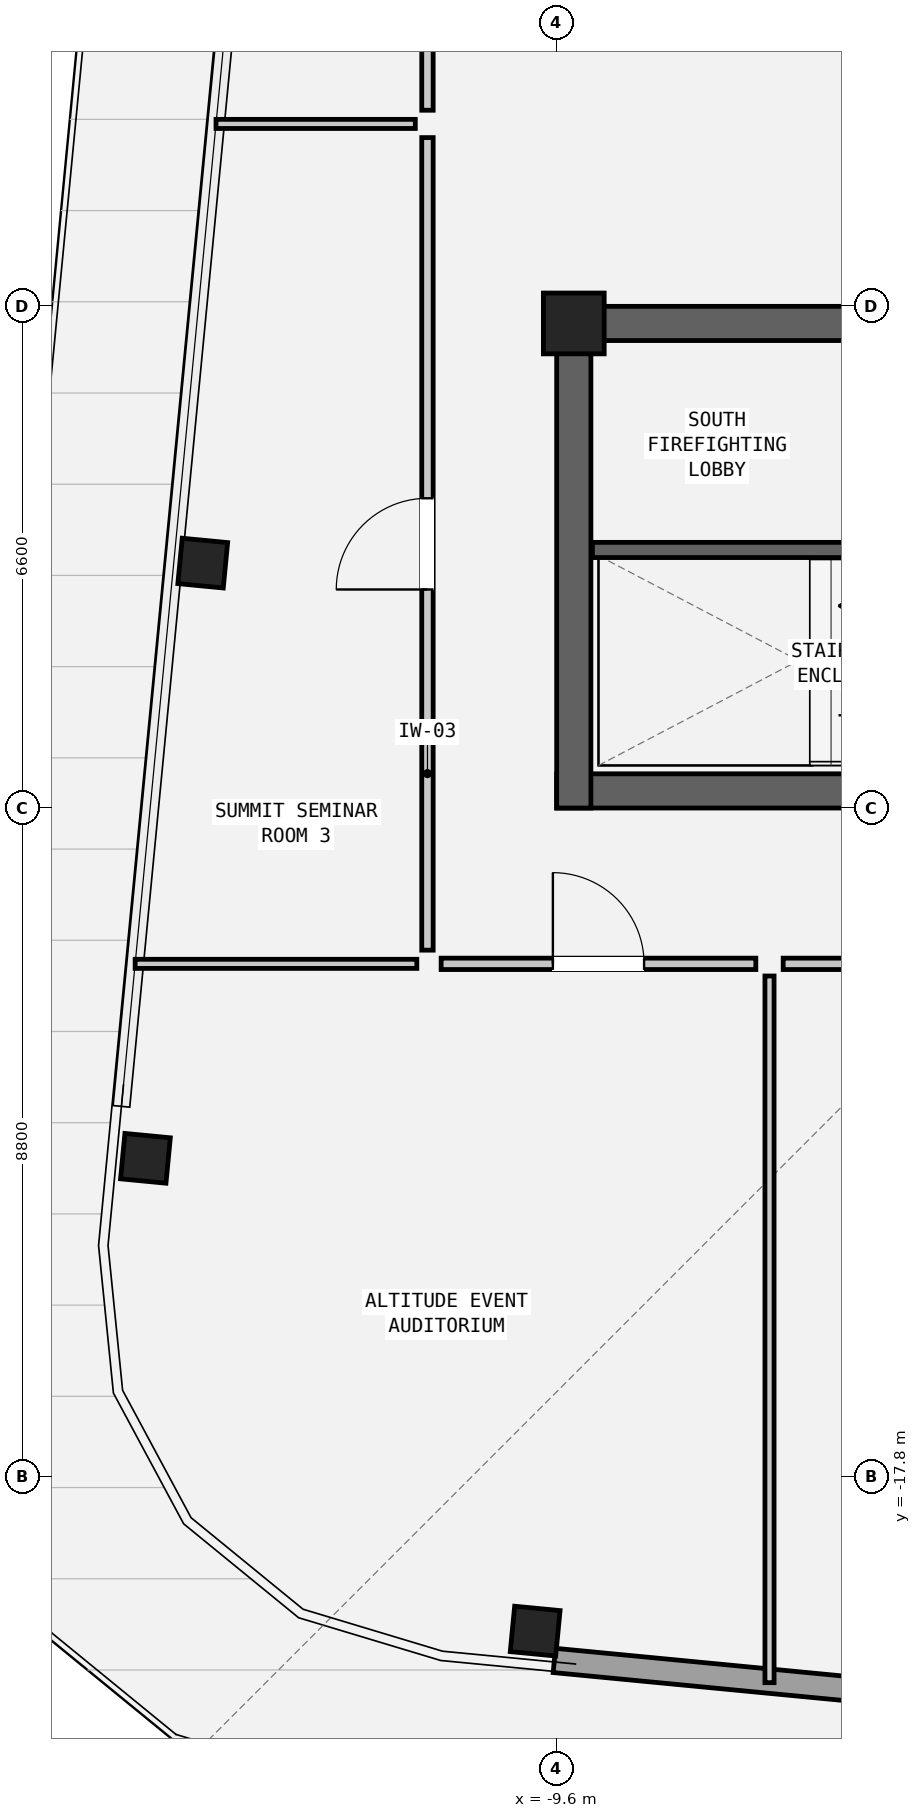
"""IFC4 building model, lengths in metres.
Left out: names, types, materials, properties, quantities, classifications, styles, units other than length and angle.
Written with IfcOpenShell. Run it as: python <this file> out.ifc"""

import sys

from ifc_helpers import new_model, si_unit, direction, frame, frame_2d, origin, origin_2d, place, context, subcontext, project, spatial, rectangle, hollow_rectangle, extrude, element, fill, save


model = new_model("IFC4")
c1 = context("Model", 3, precision=1e-05, world=origin(), true_north=direction((0.0, 1.0)))
c2 = subcontext(c1, "Body", "Model", "MODEL_VIEW")
j1 = project(units=[si_unit("LENGTHUNIT", "METRE"), si_unit("PLANEANGLEUNIT", "RADIAN")], contexts=[c1])
p1 = place(None, origin())
s1 = spatial("IfcSite", under=j1, at=p1, CompositionType="ELEMENT")
p2 = place(p1, origin())
s2 = spatial("IfcBuilding", under=s1, at=p2, CompositionType="ELEMENT")
p3 = place(p2, frame((0.0, 0.0, 276.95)))
s3 = spatial("IfcBuildingStorey", under=s2, at=p3, CompositionType="ELEMENT", Elevation=276.95)
p4 = place(p3, frame((-9.6, -8.775, 0.0), z_axis=(0.0, 0.0, 1.0), x_axis=(1.0, 0.0, 0.0)))
e1 = element("IfcWall", 1, at=p4, inside=s3, PredefinedType="SHEAR", context=c2, shape_type="SweptSolid", body=[
    extrude(rectangle(XDim=19.2, YDim=0.45, at=frame_2d((9.6, 0.0))), origin(), (0.0, 0.0, 1.0), 3.6),
])
p5 = place(p3, frame((-9.6, -2.625, 0.0), z_axis=(0.0, 0.0, 1.0), x_axis=(1.0, 0.0, 0.0)))
e2 = element("IfcWall", 2, at=p5, inside=s3, PredefinedType="SHEAR", context=c2, shape_type="SweptSolid", body=[
    extrude(rectangle(XDim=19.2, YDim=0.45, at=frame_2d((9.6, 0.0))), origin(), (0.0, 0.0, 1.0), 3.6),
])
p6 = place(p5, frame((3.8, 0.0, 0.0)))
e3 = element("IfcOpeningElement", 3, at=p6, cuts=e2, PredefinedType="OPENING", context=c2, shape_type="SweptSolid", body=[
    extrude(rectangle(XDim=1.1, YDim=2.08, at=frame_2d((0.55, 1.04))), frame((0.0, 0.237, 0.0), z_axis=(0.0, -1.0, 0.0), x_axis=(1.0, 0.0, 0.0)), (0.0, 0.0, 1.0), 0.474),
])
p7 = place(p5, frame((10.8, 0.0, 0.0)))
e4 = element("IfcOpeningElement", 4, at=p7, cuts=e2, PredefinedType="OPENING", context=c2, shape_type="SweptSolid", body=[
    extrude(rectangle(XDim=0.95, YDim=2.1, at=frame_2d((0.475, 1.05))), frame((0.0, 0.237, 0.0), z_axis=(0.0, -1.0, 0.0), x_axis=(1.0, 0.0, 0.0)), (0.0, 0.0, 1.0), 0.474),
])
p8 = place(p5, frame((14.8, 0.0, 0.0)))
e5 = element("IfcOpeningElement", 5, at=p8, cuts=e2, PredefinedType="OPENING", context=c2, shape_type="SweptSolid", body=[
    extrude(rectangle(XDim=1.6, YDim=2.12, at=frame_2d((0.8, 1.06))), frame((0.0, 0.237, 0.0), z_axis=(0.0, -1.0, 0.0), x_axis=(1.0, 0.0, 0.0)), (0.0, 0.0, 1.0), 0.474),
])
p9 = place(p3, frame((-9.375, -9.0, 0.0), z_axis=(0.0, 0.0, 1.0), x_axis=(0.0, 1.0, 0.0)))
e6 = element("IfcWall", 6, at=p9, inside=s3, PredefinedType="SHEAR", context=c2, shape_type="SweptSolid", body=[
    extrude(rectangle(XDim=6.6, YDim=0.45, at=frame_2d((3.3, 0.0))), origin(), (0.0, 0.0, 1.0), 3.6),
])
for number, where, z_axis, x_axis in (
    (7, (-9.883, -19.829, 0.0), (0.0, 0.0, 1.0), (0.995, -0.096, 0.0)),
    (8, (-14.256, -5.778, 0.0), (0.0, 0.0, 1.0), (0.096, 0.995, 0.0)),
    (9, (-15.01, -13.608, 0.0), (0.0, 0.0, 1.0), (0.096, 0.995, 0.0)),
):
    element("IfcColumn", number, at=place(p3, frame(where, z_axis=z_axis, x_axis=x_axis)), inside=s3, PredefinedType="COLUMN", context=c2, shape_type="SweptSolid", body=[
        extrude(hollow_rectangle(XDim=0.6, YDim=0.6, WallThickness=0.04, at=origin_2d()), origin(), (0.0, 0.0, 1.0), 3.6),
    ])
p10 = place(p3, frame((-9.375, -2.625, 0.0), z_axis=(0.0, 0.0, 1.0), x_axis=(1.0, 0.0, 0.0)))
e10 = element("IfcColumn", 10, at=p10, inside=s3, PredefinedType="COLUMN", context=c2, shape_type="SweptSolid", body=[
    extrude(rectangle(XDim=0.8, YDim=0.8, at=origin_2d()), origin(), (0.0, 0.0, 1.0), 3.6),
])
p11 = place(p3, frame((13.287, -22.421, 0.0), z_axis=(0.0, 0.0, 1.0), x_axis=(-0.995396042099, 0.095847375411, 0.0)))
e11 = element("IfcWall", 11, at=p11, inside=s3, PredefinedType="SOLIDWALL", context=c2, shape_type="SweptSolid", body=[
    extrude(rectangle(XDim=23.024, YDim=0.32, at=frame_2d((11.512, 0.0))), origin(), (0.0, 0.0, 1.0), 2.984),
])
p12 = place(p11, frame((3.811, 0.0, 0.0)))
e12 = element("IfcOpeningElement", 12, at=p12, cuts=e11, PredefinedType="OPENING", context=c2, shape_type="SweptSolid", body=[
    extrude(rectangle(XDim=1.25, YDim=2.02, at=frame_2d((0.625, 1.01))), frame((0.0, 0.172, 0.0), z_axis=(0.0, -1.0, 0.0), x_axis=(1.0, 0.0, 0.0)), (0.0, 0.0, 1.0), 0.344),
])
p13 = place(p3, frame((-9.13, -5.605, 0.0), z_axis=(0.0, 0.0, 1.0), x_axis=(1.0, 0.0, 0.0)))
e13 = element("IfcWall", 13, at=p13, inside=s3, PredefinedType="SHEAR", context=c2, shape_type="SweptSolid", body=[
    extrude(rectangle(XDim=6.77, YDim=0.2, at=frame_2d((3.385, 0.0))), origin(), (0.0, 0.0, 1.0), 3.41),
])
p14 = place(p13, frame((5.5, 0.0, 0.0)))
e14 = element("IfcOpeningElement", 14, at=p14, cuts=e13, PredefinedType="OPENING", context=c2, shape_type="SweptSolid", body=[
    extrude(rectangle(XDim=1.05, YDim=2.08, at=frame_2d((0.525, 1.04))), frame((0.0, 0.112, 0.0), z_axis=(0.0, -1.0, 0.0), x_axis=(1.0, 0.0, 0.0)), (0.0, 0.0, 1.0), 0.224),
])
p15 = place(p3, frame((-15.146, -11.05, 0.0), z_axis=(0.0, 0.0, 1.0), x_axis=(1.0, 0.0, 0.0)))
e15 = element("IfcWall", 15, at=p15, inside=s3, PredefinedType="PARTITIONING", context=c2, shape_type="SweptSolid", body=[
    extrude(rectangle(XDim=3.706, YDim=0.12, at=frame_2d((1.853, 0.0))), origin(), (0.0, 0.0, 1.0), 3.41),
])
p16 = place(p3, frame((-6.8, -20.507, 0.0), z_axis=(0.0, 0.0, 1.0), x_axis=(0.0, 1.0, 0.0)))
e16 = element("IfcWall", 16, at=p16, inside=s3, PredefinedType="PARTITIONING", context=c2, shape_type="SweptSolid", body=[
    extrude(rectangle(XDim=9.297, YDim=0.12, at=frame_2d((4.648, 0.0))), origin(), (0.0, 0.0, 1.0), 3.41),
])
p17 = place(p3, frame((-14.082, 0.0, 0.0), z_axis=(0.0, 0.0, 1.0), x_axis=(1.0, 0.0, 0.0)))
e17 = element("IfcWall", 17, at=p17, inside=s3, PredefinedType="PARTITIONING", context=c2, shape_type="SweptSolid", body=[
    extrude(rectangle(XDim=2.622, YDim=0.12, at=frame_2d((1.311, 0.0))), origin(), (0.0, 0.0, 1.0), 3.41),
])
p18 = place(p3, frame((-11.12, -11.05, 0.0), z_axis=(0.0, 0.0, 1.0), x_axis=(1.0, 0.0, 0.0)))
e18 = element("IfcWall", 18, at=p18, inside=s3, PredefinedType="PARTITIONING", context=c2, shape_type="SweptSolid", body=[
    extrude(rectangle(XDim=4.14, YDim=0.15, at=frame_2d((2.07, 0.0))), origin(), (0.0, 0.0, 1.0), 3.41),
])
p19 = place(p18, frame((1.47, 0.0, 0.0)))
e19 = element("IfcOpeningElement", 19, at=p19, cuts=e18, PredefinedType="OPENING", context=c2, shape_type="SweptSolid", body=[
    extrude(rectangle(XDim=1.2, YDim=2.1, at=frame_2d((0.6, 1.05))), frame((0.0, 0.087, 0.0), z_axis=(0.0, -1.0, 0.0), x_axis=(1.0, 0.0, 0.0)), (0.0, 0.0, 1.0), 0.174),
])
p20 = place(p3, frame((-6.62, -11.05, 0.0), z_axis=(0.0, 0.0, 1.0), x_axis=(1.0, 0.0, 0.0)))
e20 = element("IfcWall", 20, at=p20, inside=s3, PredefinedType="PARTITIONING", context=c2, shape_type="SweptSolid", body=[
    extrude(rectangle(XDim=6.44, YDim=0.15, at=frame_2d((3.22, 0.0))), origin(), (0.0, 0.0, 1.0), 3.41),
])
p21 = place(p20, frame((2.745, 0.0, 0.0)))
e21 = element("IfcOpeningElement", 21, at=p21, cuts=e20, PredefinedType="OPENING", context=c2, shape_type="SweptSolid", body=[
    extrude(rectangle(XDim=0.95, YDim=2.1, at=frame_2d((0.475, 1.05))), frame((0.0, 0.087, 0.0), z_axis=(0.0, -1.0, 0.0), x_axis=(1.0, 0.0, 0.0)), (0.0, 0.0, 1.0), 0.174),
])
p22 = place(p3, frame((-11.3, -10.87, 0.0), z_axis=(0.0, 0.0, 1.0), x_axis=(0.0, 1.0, 0.0)))
e22 = element("IfcWall", 22, at=p22, inside=s3, PredefinedType="PARTITIONING", context=c2, shape_type="SweptSolid", body=[
    extrude(rectangle(XDim=10.69, YDim=0.15, at=frame_2d((5.345, 0.0))), origin(), (0.0, 0.0, 1.0), 3.41),
])
p23 = place(p22, frame((4.745, 0.0, 0.0)))
e23 = element("IfcOpeningElement", 23, at=p23, cuts=e22, PredefinedType="OPENING", context=c2, shape_type="SweptSolid", body=[
    extrude(rectangle(XDim=1.2, YDim=2.1, at=frame_2d((0.6, 1.05))), frame((0.0, 0.087, 0.0), z_axis=(0.0, -1.0, 0.0), x_axis=(1.0, 0.0, 0.0)), (0.0, 0.0, 1.0), 0.174),
])
p24 = place(p3, frame((-11.3, 0.18, 0.0), z_axis=(0.0, 0.0, 1.0), x_axis=(0.0, 1.0, 0.0)))
e24 = element("IfcWall", 24, at=p24, inside=s3, PredefinedType="PARTITIONING", context=c2, shape_type="SweptSolid", body=[
    extrude(rectangle(XDim=11.89, YDim=0.15, at=frame_2d((5.945, 0.0))), origin(), (0.0, 0.0, 1.0), 3.41),
])
p25 = place(p24, frame((5.47, 0.0, 0.0)))
e25 = element("IfcOpeningElement", 25, at=p25, cuts=e24, PredefinedType="OPENING", context=c2, shape_type="SweptSolid", body=[
    extrude(rectangle(XDim=0.95, YDim=2.1, at=frame_2d((0.475, 1.05))), frame((0.0, 0.087, 0.0), z_axis=(0.0, -1.0, 0.0), x_axis=(1.0, 0.0, 0.0)), (0.0, 0.0, 1.0), 0.174),
])
p26 = place(p19, origin())
e26 = element("IfcDoor", 26, at=p26, inside=s3, OperationType="SINGLE_SWING_LEFT", PredefinedType="DOOR", context=c2, shape_type="SweptSolid", body=[
    extrude(rectangle(XDim=1.2, YDim=2.1, at=frame_2d((0.6, 1.05))), frame((0.0, 0.025, 0.0), z_axis=(0.0, -1.0, 0.0), x_axis=(1.0, 0.0, 0.0)), (0.0, 0.0, 1.0), 0.05),
])
fill(e19, e26)
p27 = place(p23, origin())
e27 = element("IfcDoor", 27, at=p27, inside=s3, OperationType="SINGLE_SWING_LEFT", PredefinedType="DOOR", context=c2, shape_type="SweptSolid", body=[
    extrude(rectangle(XDim=1.2, YDim=2.1, at=frame_2d((0.6, 1.05))), frame((0.0, 0.025, 0.0), z_axis=(0.0, -1.0, 0.0), x_axis=(1.0, 0.0, 0.0)), (0.0, 0.0, 1.0), 0.05),
])
fill(e23, e27)
save(model, sys.argv[1])
